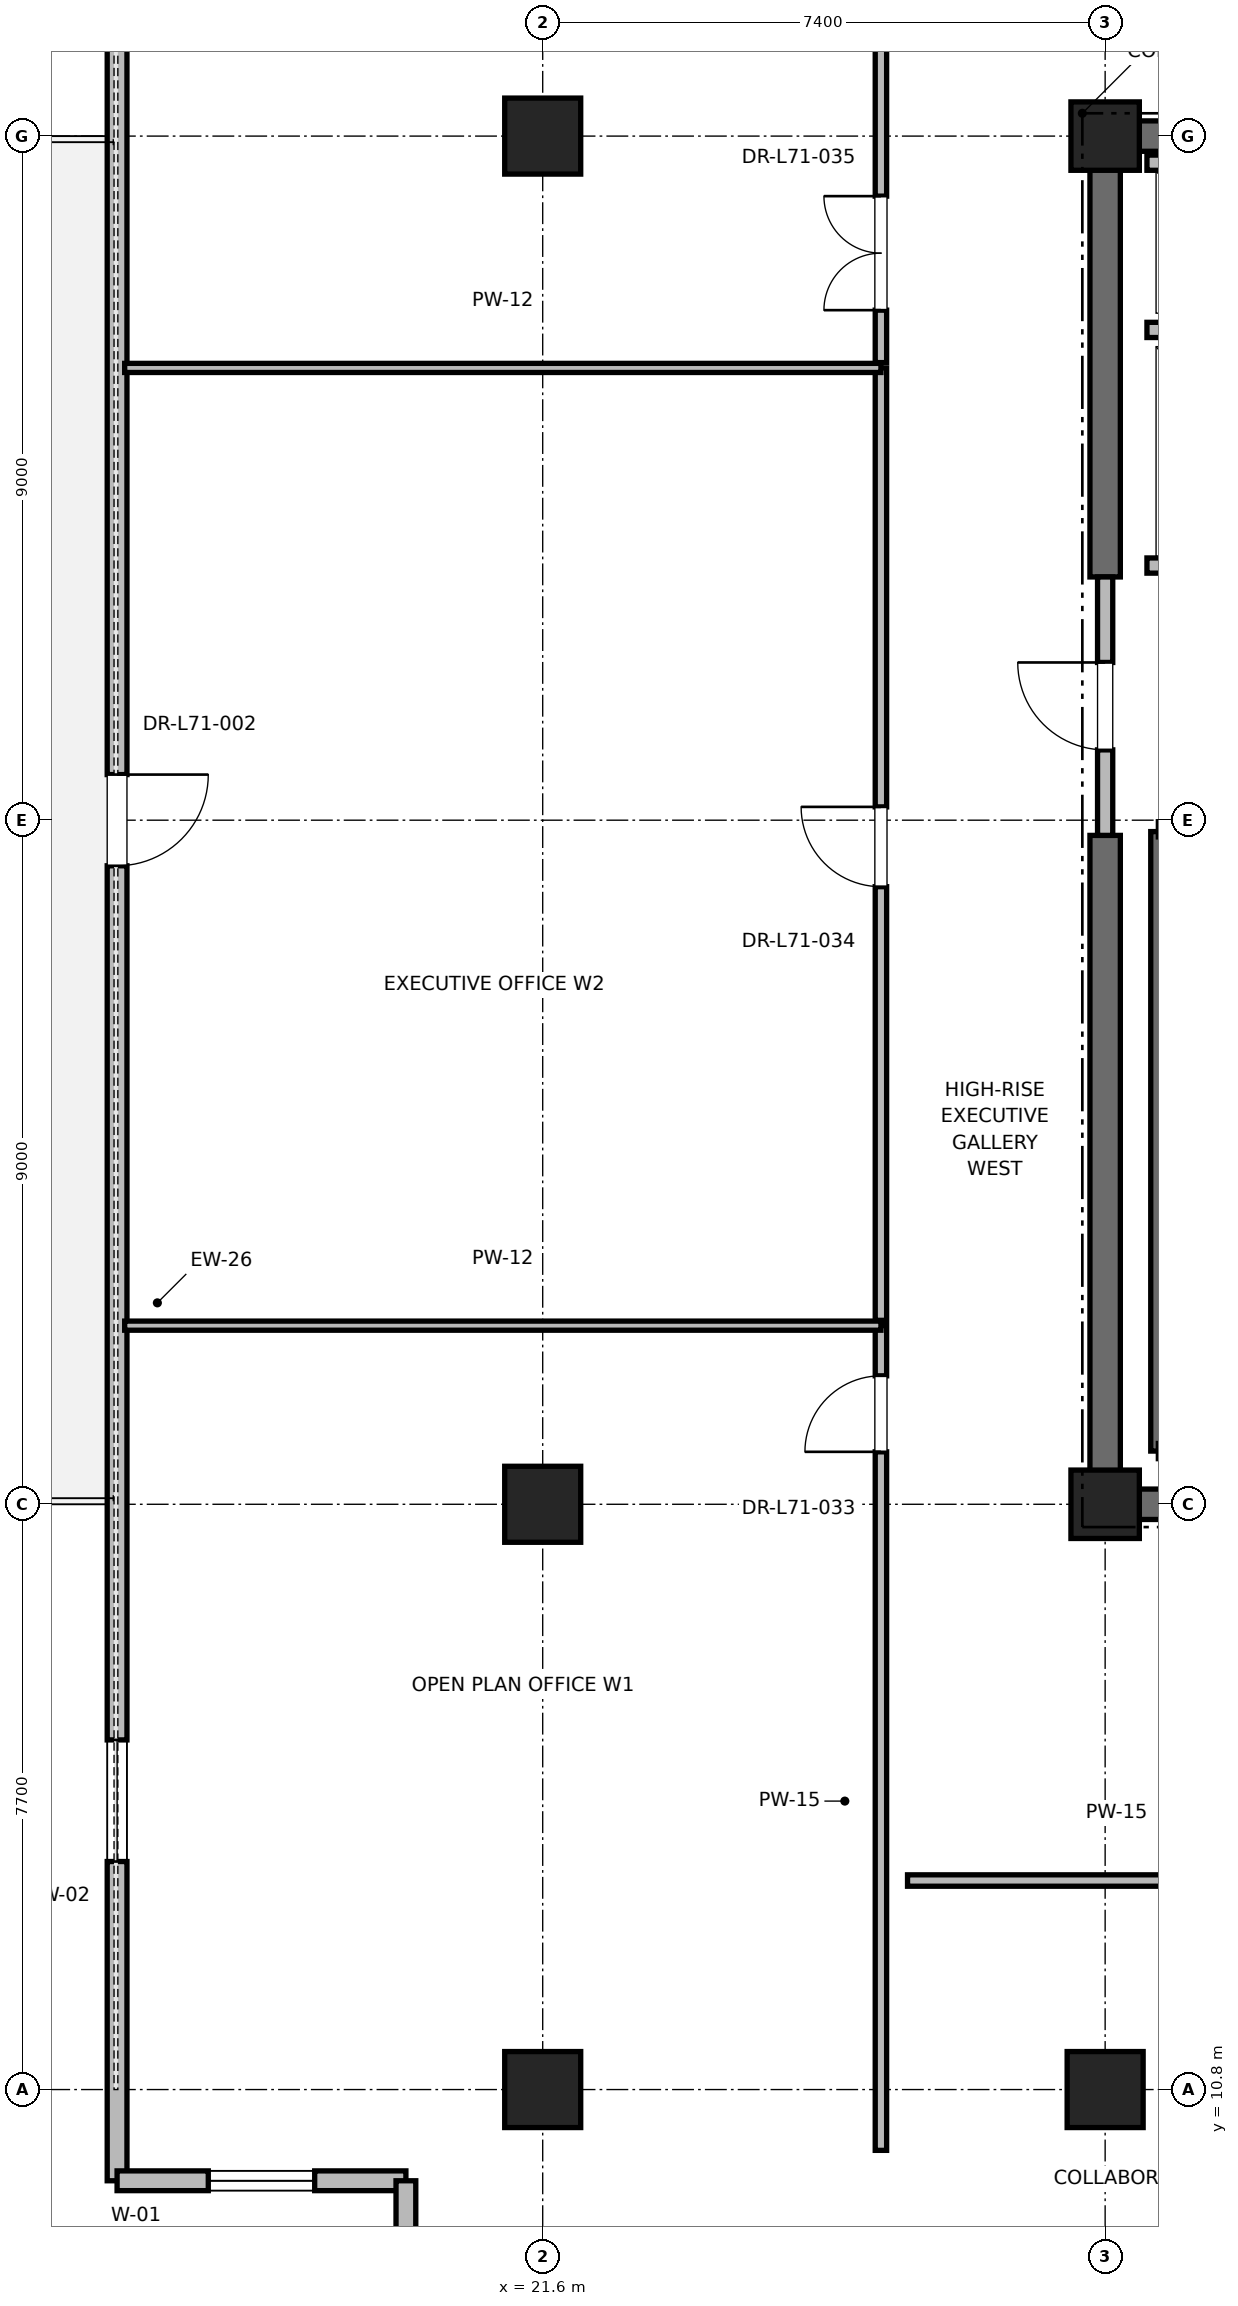
"""IFC4 building model, lengths in metres.
Left out: names, types, materials, properties, quantities, classifications, styles, units other than length and angle.
Written with IfcOpenShell. Run it as: python <this file> out.ifc"""

import sys

from ifc_helpers import new_model, si_unit, direction, frame, frame_2d, origin, origin_2d, place, context, subcontext, project, spatial, rectangle, extrude, element, fill, save


model = new_model("IFC4")
c1 = context("Model", 3, precision=1e-05, world=origin(), true_north=direction((0.0, 1.0)))
c2 = subcontext(c1, "Body", "Model", "MODEL_VIEW")
j1 = project(units=[si_unit("LENGTHUNIT", "METRE"), si_unit("PLANEANGLEUNIT", "RADIAN")], contexts=[c1])
p1 = place(None, origin())
s1 = spatial("IfcSite", under=j1, at=p1, CompositionType="ELEMENT")
p2 = place(p1, origin())
s2 = spatial("IfcBuilding", under=s1, at=p2, CompositionType="ELEMENT")
p3 = place(p2, frame((0.0, 0.0, 306.8)))
s3 = spatial("IfcBuildingStorey", under=s2, at=p3, CompositionType="ELEMENT", Elevation=306.8)
for number, where, z_axis, x_axis in (
    (1, (29.0, 10.8, 0.0), (0.0, 0.0, 1.0), (1.0, 0.0, 0.0)),
    (2, (21.6, 18.5, 0.0), (0.0, 0.0, 1.0), (1.0, 0.0, 0.0)),
    (3, (21.6, 36.5, 0.0), (0.0, 0.0, 1.0), (1.0, 0.0, 0.0)),
    (4, (21.6, 10.8, 0.0), (0.0, 0.0, 1.0), (1.0, 0.0, 0.0)),
):
    element("IfcColumn", number, at=place(p3, frame(where, z_axis=z_axis, x_axis=x_axis)), inside=s3, PredefinedType="COLUMN", context=c2, shape_type="SweptSolid", body=[
        extrude(rectangle(XDim=1.0, YDim=1.0, at=origin_2d()), origin(), (0.0, 0.0, 1.0), 4.0),
    ])
for number, where, z_axis, x_axis in (
    (5, (29.0, 18.5, 0.0), (0.0, 0.0, 1.0), (1.0, 0.0, 0.0)),
    (6, (29.0, 36.5, 0.0), (0.0, 0.0, 1.0), (1.0, 0.0, 0.0)),
):
    element("IfcColumn", number, at=place(p3, frame(where, z_axis=z_axis, x_axis=x_axis)), inside=s3, PredefinedType="PILASTER", context=c2, shape_type="SweptSolid", body=[
        extrude(rectangle(XDim=0.9, YDim=0.9, at=origin_2d()), origin(), (0.0, 0.0, 1.0), 4.0),
    ])
p4 = place(p3, frame((29.0, 18.5, 0.0), z_axis=(0.0, 0.0, 1.0), x_axis=(1.0, 0.0, 0.0)))
e7 = element("IfcWall", 7, at=p4, inside=s3, PredefinedType="SHEAR", context=c2, shape_type="SweptSolid", body=[
    extrude(rectangle(XDim=9.2, YDim=0.4, at=frame_2d((4.6, 0.0))), origin(), (0.0, 0.0, 1.0), 3.785),
])
p5 = place(p3, frame((29.0, 36.5, 0.0), z_axis=(0.0, 0.0, 1.0), x_axis=(1.0, 0.0, 0.0)))
e8 = element("IfcWall", 8, at=p5, inside=s3, PredefinedType="SHEAR", context=c2, shape_type="SweptSolid", body=[
    extrude(rectangle(XDim=5.8, YDim=0.4, at=frame_2d((2.9, 0.0))), origin(), (0.0, 0.0, 1.0), 3.785),
])
p6 = place(p3, frame((29.0, 18.5, 0.0), z_axis=(0.0, 0.0, 1.0), x_axis=(0.0, 1.0, 0.0)))
e9 = element("IfcWall", 9, at=p6, inside=s3, PredefinedType="SHEAR", context=c2, shape_type="SweptSolid", body=[
    extrude(rectangle(XDim=8.8, YDim=0.4, at=frame_2d((4.4, 0.0))), origin(), (0.0, 0.0, 1.0), 3.785),
])
p7 = place(p3, frame((29.0, 30.7, 0.0), z_axis=(0.0, 0.0, 1.0), x_axis=(0.0, 1.0, 0.0)))
e10 = element("IfcWall", 10, at=p7, inside=s3, PredefinedType="SHEAR", context=c2, shape_type="SweptSolid", body=[
    extrude(rectangle(XDim=5.8, YDim=0.4, at=frame_2d((2.9, 0.0))), origin(), (0.0, 0.0, 1.0), 3.785),
])
p8 = place(p3, frame((16.0, 45.4, 0.0), z_axis=(0.0, 0.0, 1.0), x_axis=(0.0, -1.0, 0.0)))
e11 = element("IfcWall", 11, at=p8, inside=s3, PredefinedType="PARAPET", context=c2, shape_type="SweptSolid", body=[
    extrude(rectangle(XDim=35.8, YDim=0.26, at=frame_2d((17.9, 0.0))), origin(), (0.0, 0.0, 1.0), 3.196),
])
p9 = place(p8, frame((4.2, 0.0, 0.85)))
e12 = element("IfcOpeningElement", 12, at=p9, cuts=e11, PredefinedType="OPENING", context=c2, shape_type="SweptSolid", body=[
    extrude(rectangle(XDim=1.6, YDim=2.1, at=frame_2d((0.8, 1.05))), frame((0.0, 0.13, 0.0), z_axis=(0.0, -1.0, 0.0), x_axis=(1.0, 0.0, 0.0)), (0.0, 0.0, 1.0), 0.26),
])
p10 = place(p8, frame((17.3, 0.0, 0.0)))
e13 = element("IfcOpeningElement", 13, at=p10, cuts=e11, PredefinedType="OPENING", context=c2, shape_type="SweptSolid", body=[
    extrude(rectangle(XDim=1.2, YDim=2.2, at=frame_2d((0.6, 1.1))), frame((0.0, 0.13, 0.0), z_axis=(0.0, -1.0, 0.0), x_axis=(1.0, 0.0, 0.0)), (0.0, 0.0, 1.0), 0.26),
])
p11 = place(p8, frame((30.0, 0.0, 0.85)))
e14 = element("IfcOpeningElement", 14, at=p11, cuts=e11, PredefinedType="OPENING", context=c2, shape_type="SweptSolid", body=[
    extrude(rectangle(XDim=1.6, YDim=2.1, at=frame_2d((0.8, 1.05))), frame((0.0, 0.13, 0.0), z_axis=(0.0, -1.0, 0.0), x_axis=(1.0, 0.0, 0.0)), (0.0, 0.0, 1.0), 0.26),
])
p12 = place(p3, frame((16.0, 9.6, 0.0), z_axis=(0.0, 0.0, 1.0), x_axis=(1.0, 0.0, 0.0)))
e15 = element("IfcWall", 15, at=p12, inside=s3, PredefinedType="PARAPET", context=c2, shape_type="SweptSolid", body=[
    extrude(rectangle(XDim=3.8, YDim=0.26, at=frame_2d((1.9, 0.0))), origin(), (0.0, 0.0, 1.0), 3.785),
])
p13 = place(p12, frame((1.2, 0.0, 0.85)))
e16 = element("IfcOpeningElement", 16, at=p13, cuts=e15, PredefinedType="OPENING", context=c2, shape_type="SweptSolid", body=[
    extrude(rectangle(XDim=1.4, YDim=2.0, at=frame_2d((0.7, 1.0))), frame((0.0, 0.13, 0.0), z_axis=(0.0, -1.0, 0.0), x_axis=(1.0, 0.0, 0.0)), (0.0, 0.0, 1.0), 0.26),
])
p14 = place(p3, frame((19.8, 9.6, 0.0), z_axis=(0.0, 0.0, 1.0), x_axis=(0.0, -1.0, 0.0)))
e17 = element("IfcWall", 17, at=p14, inside=s3, PredefinedType="PARAPET", context=c2, shape_type="SweptSolid", body=[
    extrude(rectangle(XDim=3.3, YDim=0.26, at=frame_2d((1.65, 0.0))), origin(), (0.0, 0.0, 1.0), 3.785),
])
p15 = place(p3, frame((29.7, 19.2, 0.0), z_axis=(0.0, 0.0, 1.0), x_axis=(0.0, 1.0, 0.0)))
e18 = element("IfcWall", 18, at=p15, inside=s3, PredefinedType="SOLIDWALL", context=c2, shape_type="SweptSolid", body=[
    extrude(rectangle(XDim=8.15, YDim=0.2, at=frame_2d((4.075, 0.0))), origin(), (0.0, 0.0, 1.0), 3.785),
])
p16 = place(p3, frame((29.0, 27.3, 0.0), z_axis=(0.0, 0.0, 1.0), x_axis=(0.0, 1.0, 0.0)))
e19 = element("IfcWall", 19, at=p16, inside=s3, PredefinedType="PARTITIONING", context=c2, shape_type="SweptSolid", body=[
    extrude(rectangle(XDim=3.4, YDim=0.2, at=frame_2d((1.7, 0.0))), origin(), (0.0, 0.0, 1.0), 2.865),
])
p17 = place(p16, frame((1.125, 0.0, 0.0)))
e20 = element("IfcOpeningElement", 20, at=p17, cuts=e19, PredefinedType="OPENING", context=c2, shape_type="SweptSolid", body=[
    extrude(rectangle(XDim=1.15, YDim=2.2, at=frame_2d((0.575, 1.1))), frame((0.0, 0.1, 0.0), z_axis=(0.0, -1.0, 0.0), x_axis=(1.0, 0.0, 0.0)), (0.0, 0.0, 1.0), 0.2),
])
p18 = place(p3, frame((29.55, 30.85, 0.0), z_axis=(0.0, 0.0, 1.0), x_axis=(1.0, 0.0, 0.0)))
e21 = element("IfcWall", 21, at=p18, inside=s3, PredefinedType="SOLIDWALL", context=c2, shape_type="SweptSolid", body=[
    extrude(rectangle(XDim=2.6, YDim=0.2, at=frame_2d((1.3, 0.0))), origin(), (0.0, 0.0, 1.0), 2.865),
])
p19 = place(p18, frame((0.75, 0.0, 0.0)))
e22 = element("IfcOpeningElement", 22, at=p19, cuts=e21, PredefinedType="OPENING", context=c2, shape_type="SweptSolid", body=[
    extrude(rectangle(XDim=1.1, YDim=2.2, at=frame_2d((0.55, 1.1))), frame((0.0, 0.1, 0.0), z_axis=(0.0, -1.0, 0.0), x_axis=(1.0, 0.0, 0.0)), (0.0, 0.0, 1.0), 0.2),
])
p20 = place(p3, frame((29.55, 33.95, 0.0), z_axis=(0.0, 0.0, 1.0), x_axis=(1.0, 0.0, 0.0)))
e23 = element("IfcWall", 23, at=p20, inside=s3, PredefinedType="SOLIDWALL", context=c2, shape_type="SweptSolid", body=[
    extrude(rectangle(XDim=2.8, YDim=0.2, at=frame_2d((1.4, 0.0))), origin(), (0.0, 0.0, 1.0), 3.785),
])
p21 = place(p3, frame((32.35, 36.15, 0.0), z_axis=(0.0, 0.0, 1.0), x_axis=(-1.0, 0.0, 0.0)))
e24 = element("IfcWall", 24, at=p21, inside=s3, PredefinedType="SOLIDWALL", context=c2, shape_type="SweptSolid", body=[
    extrude(rectangle(XDim=2.8, YDim=0.2, at=frame_2d((1.4, 0.0))), origin(), (0.0, 0.0, 1.0), 3.22),
])
p22 = place(p3, frame((26.4, 13.55, 0.0), z_axis=(0.0, 0.0, 1.0), x_axis=(1.0, 0.0, 0.0)))
e25 = element("IfcWall", 25, at=p22, inside=s3, PredefinedType="PARTITIONING", context=c2, shape_type="SweptSolid", body=[
    extrude(rectangle(XDim=11.968, YDim=0.15, at=frame_2d((5.984, 0.0))), origin(), (0.0, 0.0, 1.0), 2.85),
])
p23 = place(p22, frame((5.499, 0.0, 0.0)))
e26 = element("IfcOpeningElement", 26, at=p23, cuts=e25, PredefinedType="OPENING", context=c2, shape_type="SweptSolid", body=[
    extrude(rectangle(XDim=1.0, YDim=2.15, at=frame_2d((0.5, 1.075))), frame((0.0, 0.075, 0.0), z_axis=(0.0, -1.0, 0.0), x_axis=(1.0, 0.0, 0.0)), (0.0, 0.0, 1.0), 0.15),
])
p24 = place(p3, frame((26.05, 10.0, 0.0), z_axis=(0.0, 0.0, 1.0), x_axis=(0.0, 1.0, 0.0)))
e27 = element("IfcWall", 27, at=p24, inside=s3, PredefinedType="PARTITIONING", context=c2, shape_type="SweptSolid", body=[
    extrude(rectangle(XDim=10.85, YDim=0.15, at=frame_2d((5.425, 0.0))), origin(), (0.0, 0.0, 1.0), 2.85),
])
p25 = place(p24, frame((9.19, 0.0, 0.0)))
e28 = element("IfcOpeningElement", 28, at=p25, cuts=e27, PredefinedType="OPENING", context=c2, shape_type="SweptSolid", body=[
    extrude(rectangle(XDim=1.0, YDim=2.15, at=frame_2d((0.5, 1.075))), frame((0.0, 0.075, 0.0), z_axis=(0.0, -1.0, 0.0), x_axis=(1.0, 0.0, 0.0)), (0.0, 0.0, 1.0), 0.15),
])
p26 = place(p3, frame((16.1, 20.85, 0.0), z_axis=(0.0, 0.0, 1.0), x_axis=(1.0, 0.0, 0.0)))
e29 = element("IfcWall", 29, at=p26, inside=s3, PredefinedType="PARTITIONING", context=c2, shape_type="SweptSolid", body=[
    extrude(rectangle(XDim=9.95, YDim=0.12, at=frame_2d((4.975, 0.0))), origin(), (0.0, 0.0, 1.0), 2.85),
])
p27 = place(p3, frame((26.05, 20.92, 0.0), z_axis=(0.0, 0.0, 1.0), x_axis=(0.0, 1.0, 0.0)))
e30 = element("IfcWall", 30, at=p27, inside=s3, PredefinedType="PARTITIONING", context=c2, shape_type="SweptSolid", body=[
    extrude(rectangle(XDim=12.53, YDim=0.15, at=frame_2d((6.265, 0.0))), origin(), (0.0, 0.0, 1.0), 2.85),
])
p28 = place(p27, frame((5.705, 0.0, 0.0)))
e31 = element("IfcOpeningElement", 31, at=p28, cuts=e30, PredefinedType="OPENING", context=c2, shape_type="SweptSolid", body=[
    extrude(rectangle(XDim=1.05, YDim=2.2, at=frame_2d((0.525, 1.1))), frame((0.0, 0.075, 0.0), z_axis=(0.0, -1.0, 0.0), x_axis=(1.0, 0.0, 0.0)), (0.0, 0.0, 1.0), 0.15),
])
p29 = place(p3, frame((16.1, 33.45, 0.0), z_axis=(0.0, 0.0, 1.0), x_axis=(1.0, 0.0, 0.0)))
e32 = element("IfcWall", 32, at=p29, inside=s3, PredefinedType="PARTITIONING", context=c2, shape_type="SweptSolid", body=[
    extrude(rectangle(XDim=9.95, YDim=0.12, at=frame_2d((4.975, 0.0))), origin(), (0.0, 0.0, 1.0), 2.85),
])
p30 = place(p3, frame((26.05, 33.52, 0.0), z_axis=(0.0, 0.0, 1.0), x_axis=(0.0, 1.0, 0.0)))
e33 = element("IfcWall", 33, at=p30, inside=s3, PredefinedType="PARTITIONING", context=c2, shape_type="SweptSolid", body=[
    extrude(rectangle(XDim=11.48, YDim=0.15, at=frame_2d((5.74, 0.0))), origin(), (0.0, 0.0, 1.0), 2.85),
])
p31 = place(p30, frame((0.69, 0.0, 0.0)))
e34 = element("IfcOpeningElement", 34, at=p31, cuts=e33, PredefinedType="OPENING", context=c2, shape_type="SweptSolid", body=[
    extrude(rectangle(XDim=1.5, YDim=2.25, at=frame_2d((0.75, 1.125))), frame((0.0, 0.075, 0.0), z_axis=(0.0, -1.0, 0.0), x_axis=(1.0, 0.0, 0.0)), (0.0, 0.0, 1.0), 0.15),
])
p32 = place(p10, origin())
e35 = element("IfcDoor", 35, at=p32, inside=s3, OperationType="SINGLE_SWING_LEFT", PredefinedType="DOOR", context=c2, shape_type="SweptSolid", body=[
    extrude(rectangle(XDim=1.2, YDim=2.2, at=frame_2d((0.6, 1.1))), frame((0.0, 0.025, 0.0), z_axis=(0.0, -1.0, 0.0), x_axis=(1.0, 0.0, 0.0)), (0.0, 0.0, 1.0), 0.05),
])
fill(e13, e35)
p33 = place(p11, origin())
e36 = element("IfcWindow", 36, at=p33, inside=s3, PartitioningType="SINGLE_PANEL", PredefinedType="WINDOW", context=c2, shape_type="SweptSolid", body=[
    extrude(rectangle(XDim=1.6, YDim=2.1, at=frame_2d((0.8, 1.05))), frame((0.0, 0.03, 0.0), z_axis=(0.0, -1.0, 0.0), x_axis=(1.0, 0.0, 0.0)), (0.0, 0.0, 1.0), 0.06),
])
fill(e14, e36)
p34 = place(p13, origin())
e37 = element("IfcWindow", 37, at=p34, inside=s3, PartitioningType="SINGLE_PANEL", PredefinedType="WINDOW", context=c2, shape_type="SweptSolid", body=[
    extrude(rectangle(XDim=1.4, YDim=2.0, at=frame_2d((0.7, 1.0))), frame((0.0, 0.03, 0.0), z_axis=(0.0, -1.0, 0.0), x_axis=(1.0, 0.0, 0.0)), (0.0, 0.0, 1.0), 0.06),
])
fill(e16, e37)
p35 = place(p17, origin())
e38 = element("IfcDoor", 38, at=p35, inside=s3, OperationType="SINGLE_SWING_RIGHT", PredefinedType="DOOR", context=c2, shape_type="SweptSolid", body=[
    extrude(rectangle(XDim=1.15, YDim=2.2, at=frame_2d((0.575, 1.1))), frame((0.0, 0.025, 0.0), z_axis=(0.0, -1.0, 0.0), x_axis=(1.0, 0.0, 0.0)), (0.0, 0.0, 1.0), 0.05),
])
fill(e20, e38)
p36 = place(p25, origin())
e39 = element("IfcDoor", 39, at=p36, inside=s3, OperationType="SINGLE_SWING_LEFT", PredefinedType="DOOR", context=c2, shape_type="SweptSolid", body=[
    extrude(rectangle(XDim=1.0, YDim=2.15, at=frame_2d((0.5, 1.075))), frame((0.0, 0.025, 0.0), z_axis=(0.0, -1.0, 0.0), x_axis=(1.0, 0.0, 0.0)), (0.0, 0.0, 1.0), 0.05),
])
fill(e28, e39)
p37 = place(p28, origin())
e40 = element("IfcDoor", 40, at=p37, inside=s3, OperationType="SINGLE_SWING_RIGHT", PredefinedType="DOOR", context=c2, shape_type="SweptSolid", body=[
    extrude(rectangle(XDim=1.05, YDim=2.2, at=frame_2d((0.525, 1.1))), frame((0.0, 0.025, 0.0), z_axis=(0.0, -1.0, 0.0), x_axis=(1.0, 0.0, 0.0)), (0.0, 0.0, 1.0), 0.05),
])
fill(e31, e40)
p38 = place(p31, origin())
e41 = element("IfcDoor", 41, at=p38, inside=s3, OperationType="DOUBLE_DOOR_SINGLE_SWING", PredefinedType="DOOR", context=c2, shape_type="SweptSolid", body=[
    extrude(rectangle(XDim=1.5, YDim=2.25, at=frame_2d((0.75, 1.125))), frame((0.0, 0.025, 0.0), z_axis=(0.0, -1.0, 0.0), x_axis=(1.0, 0.0, 0.0)), (0.0, 0.0, 1.0), 0.05),
])
fill(e34, e41)
save(model, sys.argv[1])
